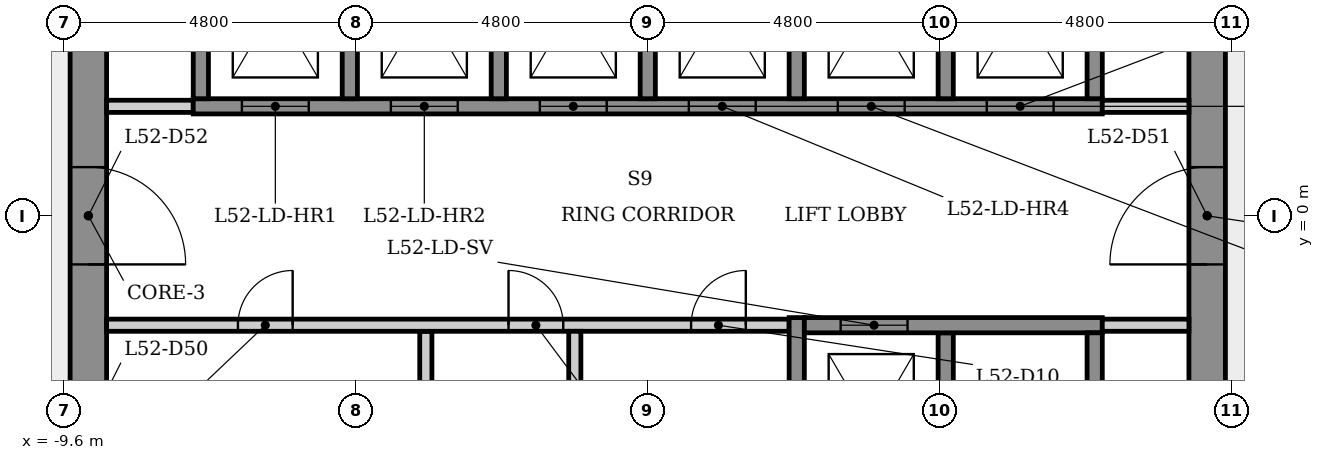
"""IFC4 building model, lengths in metres.
Left out: names, types, materials, properties, quantities, classifications, styles, units other than length and angle.
Written with IfcOpenShell. Run it as: python <this file> out.ifc"""

import sys

from ifc_helpers import new_model, si_unit, direction, frame, frame_2d, origin, place, context, subcontext, project, spatial, rectangle, extrude, element, fill, save


model = new_model("IFC4")
c1 = context("Model", 3, precision=1e-05, world=origin(), true_north=direction((0.0, 1.0)))
c2 = subcontext(c1, "Body", "Model", "MODEL_VIEW")
j1 = project(units=[si_unit("LENGTHUNIT", "METRE"), si_unit("PLANEANGLEUNIT", "RADIAN")], contexts=[c1])
p1 = place(None, origin())
s1 = spatial("IfcSite", under=j1, at=p1, CompositionType="ELEMENT")
p2 = place(p1, origin())
s2 = spatial("IfcBuilding", under=s1, at=p2, CompositionType="ELEMENT")
p3 = place(p2, frame((0.0, 0.0, 194.7)))
s3 = spatial("IfcBuildingStorey", under=s2, at=p3, CompositionType="ELEMENT", Elevation=194.7)
p4 = place(p3, frame((9.2, -5.485, 0.0), z_axis=(0.0, 0.0, 1.0), x_axis=(0.0, 1.0, 0.0)))
e1 = element("IfcWall", 1, at=p4, inside=s3, PredefinedType="SHEAR", context=c2, shape_type="SweptSolid", body=[
    extrude(rectangle(XDim=10.97, YDim=0.6, at=frame_2d((5.485, 0.0))), origin(), (0.0, 0.0, 1.0), 4.0),
])
p5 = place(p4, frame((4.685, 0.0, 0.0)))
e2 = element("IfcOpeningElement", 2, at=p5, cuts=e1, PredefinedType="OPENING", context=c2, shape_type="SweptSolid", body=[
    extrude(rectangle(XDim=1.6, YDim=2.1, at=frame_2d((0.8, 1.05))), frame((0.0, 0.31, 0.0), z_axis=(0.0, -1.0, 0.0), x_axis=(1.0, 0.0, 0.0)), (0.0, 0.0, 1.0), 0.62),
])
p6 = place(p3, frame((-9.2, 5.485, 0.0), z_axis=(0.0, 0.0, 1.0), x_axis=(0.0, -1.0, 0.0)))
e3 = element("IfcWall", 3, at=p6, inside=s3, PredefinedType="SHEAR", context=c2, shape_type="SweptSolid", body=[
    extrude(rectangle(XDim=10.97, YDim=0.6, at=frame_2d((5.485, 0.0))), origin(), (0.0, 0.0, 1.0), 4.0),
])
p7 = place(p6, frame((8.516, 0.0, 0.0)))
e4 = element("IfcOpeningElement", 4, at=p7, cuts=e3, PredefinedType="OPENING", context=c2, shape_type="SweptSolid", body=[
    extrude(rectangle(XDim=0.9, YDim=2.1, at=frame_2d((0.45, 1.05))), frame((0.0, 0.31, 0.0), z_axis=(0.0, -1.0, 0.0), x_axis=(1.0, 0.0, 0.0)), (0.0, 0.0, 1.0), 0.62),
])
p8 = place(p6, frame((4.685, 0.0, 0.0)))
e5 = element("IfcOpeningElement", 5, at=p8, cuts=e3, PredefinedType="OPENING", context=c2, shape_type="SweptSolid", body=[
    extrude(rectangle(XDim=1.6, YDim=2.1, at=frame_2d((0.8, 1.05))), frame((0.0, 0.31, 0.0), z_axis=(0.0, -1.0, 0.0), x_axis=(1.0, 0.0, 0.0)), (0.0, 0.0, 1.0), 0.62),
])
p9 = place(p3, frame((-8.9, 1.8, 0.0), z_axis=(0.0, 0.0, 1.0), x_axis=(1.0, 0.0, 0.0)))
e6 = element("IfcWall", 6, at=p9, inside=s3, PredefinedType="PARTITIONING", context=c2, shape_type="SweptSolid", body=[
    extrude(rectangle(XDim=1.425, YDim=0.2, at=frame_2d((0.712, 0.0))), origin(), (0.0, 0.0, 1.0), 3.65),
])
p10 = place(p3, frame((-7.475, 1.8, 0.0), z_axis=(0.0, 0.0, 1.0), x_axis=(1.0, 0.0, 0.0)))
e7 = element("IfcWall", 7, at=p10, inside=s3, PredefinedType="SHEAR", context=c2, shape_type="SweptSolid", body=[
    extrude(rectangle(XDim=14.95, YDim=0.25, at=frame_2d((7.475, 0.0))), origin(), (0.0, 0.0, 1.0), 3.65),
])
p11 = place(p10, frame((0.8, 0.0, 0.0)))
e8 = element("IfcOpeningElement", 8, at=p11, cuts=e7, PredefinedType="OPENING", context=c2, shape_type="SweptSolid", body=[
    extrude(rectangle(XDim=1.1, YDim=2.1, at=frame_2d((0.55, 1.05))), frame((0.0, 0.135, 0.0), z_axis=(0.0, -1.0, 0.0), x_axis=(1.0, 0.0, 0.0)), (0.0, 0.0, 1.0), 0.27),
])
p12 = place(p10, frame((3.25, 0.0, 0.0)))
e9 = element("IfcOpeningElement", 9, at=p12, cuts=e7, PredefinedType="OPENING", context=c2, shape_type="SweptSolid", body=[
    extrude(rectangle(XDim=1.1, YDim=2.1, at=frame_2d((0.55, 1.05))), frame((0.0, 0.135, 0.0), z_axis=(0.0, -1.0, 0.0), x_axis=(1.0, 0.0, 0.0)), (0.0, 0.0, 1.0), 0.27),
])
p13 = place(p10, frame((5.7, 0.0, 0.0)))
e10 = element("IfcOpeningElement", 10, at=p13, cuts=e7, PredefinedType="OPENING", context=c2, shape_type="SweptSolid", body=[
    extrude(rectangle(XDim=1.1, YDim=2.1, at=frame_2d((0.55, 1.05))), frame((0.0, 0.135, 0.0), z_axis=(0.0, -1.0, 0.0), x_axis=(1.0, 0.0, 0.0)), (0.0, 0.0, 1.0), 0.27),
])
p14 = place(p10, frame((8.15, 0.0, 0.0)))
e11 = element("IfcOpeningElement", 11, at=p14, cuts=e7, PredefinedType="OPENING", context=c2, shape_type="SweptSolid", body=[
    extrude(rectangle(XDim=1.1, YDim=2.1, at=frame_2d((0.55, 1.05))), frame((0.0, 0.135, 0.0), z_axis=(0.0, -1.0, 0.0), x_axis=(1.0, 0.0, 0.0)), (0.0, 0.0, 1.0), 0.27),
])
p15 = place(p10, frame((10.6, 0.0, 0.0)))
e12 = element("IfcOpeningElement", 12, at=p15, cuts=e7, PredefinedType="OPENING", context=c2, shape_type="SweptSolid", body=[
    extrude(rectangle(XDim=1.1, YDim=2.1, at=frame_2d((0.55, 1.05))), frame((0.0, 0.135, 0.0), z_axis=(0.0, -1.0, 0.0), x_axis=(1.0, 0.0, 0.0)), (0.0, 0.0, 1.0), 0.27),
])
p16 = place(p10, frame((13.05, 0.0, 0.0)))
e13 = element("IfcOpeningElement", 13, at=p16, cuts=e7, PredefinedType="OPENING", context=c2, shape_type="SweptSolid", body=[
    extrude(rectangle(XDim=1.1, YDim=2.1, at=frame_2d((0.55, 1.05))), frame((0.0, 0.135, 0.0), z_axis=(0.0, -1.0, 0.0), x_axis=(1.0, 0.0, 0.0)), (0.0, 0.0, 1.0), 0.27),
])
p17 = place(p3, frame((-7.35, 1.925, 0.0), z_axis=(0.0, 0.0, 1.0), x_axis=(0.0, 1.0, 0.0)))
e14 = element("IfcWall", 14, at=p17, inside=s3, PredefinedType="SHEAR", context=c2, shape_type="SweptSolid", body=[
    extrude(rectangle(XDim=4.036, YDim=0.25, at=frame_2d((2.018, 0.0))), origin(), (0.0, 0.0, 1.0), 3.65),
])
p18 = place(p3, frame((-4.9, 5.025, 0.0), z_axis=(0.0, 0.0, 1.0), x_axis=(0.0, -1.0, 0.0)))
e15 = element("IfcWall", 15, at=p18, inside=s3, PredefinedType="SHEAR", context=c2, shape_type="SweptSolid", body=[
    extrude(rectangle(XDim=3.1, YDim=0.25, at=frame_2d((1.55, 0.0))), origin(), (0.0, 0.0, 1.0), 4.0),
])
p19 = place(p3, frame((-3.65, -1.9, 0.0), z_axis=(0.0, 0.0, 1.0), x_axis=(0.0, -1.0, 0.0)))
e16 = element("IfcWall", 16, at=p19, inside=s3, PredefinedType="PARTITIONING", context=c2, shape_type="SweptSolid", body=[
    extrude(rectangle(XDim=3.15, YDim=0.2, at=frame_2d((1.575, 0.0))), origin(), (0.0, 0.0, 1.0), 3.65),
])
p20 = place(p3, frame((-8.9, -1.8, 0.0), z_axis=(0.0, 0.0, 1.0), x_axis=(1.0, 0.0, 0.0)))
e17 = element("IfcWall", 17, at=p20, inside=s3, PredefinedType="PARTITIONING", context=c2, shape_type="SweptSolid", body=[
    extrude(rectangle(XDim=11.225, YDim=0.2, at=frame_2d((5.613, 0.0))), origin(), (0.0, 0.0, 1.0), 3.65),
])
p21 = place(p20, frame((2.16, 0.0, 0.0)))
e18 = element("IfcOpeningElement", 18, at=p21, cuts=e17, PredefinedType="OPENING", context=c2, shape_type="SweptSolid", body=[
    extrude(rectangle(XDim=0.9, YDim=2.1, at=frame_2d((0.45, 1.05))), frame((0.0, 0.11, 0.0), z_axis=(0.0, -1.0, 0.0), x_axis=(1.0, 0.0, 0.0)), (0.0, 0.0, 1.0), 0.22),
])
p22 = place(p20, frame((6.61, 0.0, 0.0)))
e19 = element("IfcOpeningElement", 19, at=p22, cuts=e17, PredefinedType="OPENING", context=c2, shape_type="SweptSolid", body=[
    extrude(rectangle(XDim=0.9, YDim=2.1, at=frame_2d((0.45, 1.05))), frame((0.0, 0.11, 0.0), z_axis=(0.0, -1.0, 0.0), x_axis=(1.0, 0.0, 0.0)), (0.0, 0.0, 1.0), 0.22),
])
p23 = place(p20, frame((9.613, 0.0, 0.0)))
e20 = element("IfcOpeningElement", 20, at=p23, cuts=e17, PredefinedType="OPENING", context=c2, shape_type="SweptSolid", body=[
    extrude(rectangle(XDim=0.9, YDim=2.1, at=frame_2d((0.45, 1.05))), frame((0.0, 0.11, 0.0), z_axis=(0.0, -1.0, 0.0), x_axis=(1.0, 0.0, 0.0)), (0.0, 0.0, 1.0), 0.22),
])
p24 = place(p3, frame((-2.45, 5.025, 0.0), z_axis=(0.0, 0.0, 1.0), x_axis=(0.0, -1.0, 0.0)))
e21 = element("IfcWall", 21, at=p24, inside=s3, PredefinedType="SHEAR", context=c2, shape_type="SweptSolid", body=[
    extrude(rectangle(XDim=3.1, YDim=0.25, at=frame_2d((1.55, 0.0))), origin(), (0.0, 0.0, 1.0), 4.0),
])
p25 = place(p3, frame((-1.2, -1.9, 0.0), z_axis=(0.0, 0.0, 1.0), x_axis=(0.0, -1.0, 0.0)))
e22 = element("IfcWall", 22, at=p25, inside=s3, PredefinedType="PARTITIONING", context=c2, shape_type="SweptSolid", body=[
    extrude(rectangle(XDim=3.15, YDim=0.2, at=frame_2d((1.575, 0.0))), origin(), (0.0, 0.0, 1.0), 3.65),
])
p26 = place(p3, frame((0.0, 5.025, 0.0), z_axis=(0.0, 0.0, 1.0), x_axis=(0.0, -1.0, 0.0)))
e23 = element("IfcWall", 23, at=p26, inside=s3, PredefinedType="SHEAR", context=c2, shape_type="SweptSolid", body=[
    extrude(rectangle(XDim=3.1, YDim=0.25, at=frame_2d((1.55, 0.0))), origin(), (0.0, 0.0, 1.0), 4.0),
])
p27 = place(p3, frame((2.45, -5.275, 0.0), z_axis=(0.0, 0.0, 1.0), x_axis=(0.0, 1.0, 0.0)))
e24 = element("IfcWall", 24, at=p27, inside=s3, PredefinedType="SHEAR", context=c2, shape_type="SweptSolid", body=[
    extrude(rectangle(XDim=3.6, YDim=0.25, at=frame_2d((1.8, 0.0))), origin(), (0.0, 0.0, 1.0), 3.65),
])
for number, where, z_axis, x_axis in (
    (25, (2.45, 5.025, 0.0), (0.0, 0.0, 1.0), (0.0, -1.0, 0.0)),
    (26, (4.9, -1.925, 0.0), (0.0, 0.0, 1.0), (0.0, -1.0, 0.0)),
    (27, (4.9, 5.025, 0.0), (0.0, 0.0, 1.0), (0.0, -1.0, 0.0)),
):
    element("IfcWall", number, at=place(p3, frame(where, z_axis=z_axis, x_axis=x_axis)), inside=s3, PredefinedType="SHEAR", context=c2, shape_type="SweptSolid", body=[
        extrude(rectangle(XDim=3.1, YDim=0.25, at=frame_2d((1.55, 0.0))), origin(), (0.0, 0.0, 1.0), 4.0),
    ])
p28 = place(p3, frame((2.575, -1.8, 0.0), z_axis=(0.0, 0.0, 1.0), x_axis=(1.0, 0.0, 0.0)))
e28 = element("IfcWall", 28, at=p28, inside=s3, PredefinedType="SHEAR", context=c2, shape_type="SweptSolid", body=[
    extrude(rectangle(XDim=4.9, YDim=0.25, at=frame_2d((2.45, 0.0))), origin(), (0.0, 0.0, 1.0), 3.65),
])
p29 = place(p28, frame((0.597, 0.0, 0.0)))
e29 = element("IfcOpeningElement", 29, at=p29, cuts=e28, PredefinedType="OPENING", context=c2, shape_type="SweptSolid", body=[
    extrude(rectangle(XDim=1.1, YDim=2.1, at=frame_2d((0.55, 1.05))), frame((0.0, 0.135, 0.0), z_axis=(0.0, -1.0, 0.0), x_axis=(1.0, 0.0, 0.0)), (0.0, 0.0, 1.0), 0.27),
])
p30 = place(p3, frame((7.475, 1.8, 0.0), z_axis=(0.0, 0.0, 1.0), x_axis=(1.0, 0.0, 0.0)))
e30 = element("IfcWall", 30, at=p30, inside=s3, PredefinedType="PARTITIONING", context=c2, shape_type="SweptSolid", body=[
    extrude(rectangle(XDim=1.425, YDim=0.2, at=frame_2d((0.712, 0.0))), origin(), (0.0, 0.0, 1.0), 3.65),
])
for number, where, z_axis, x_axis in (
    (31, (7.35, -1.925, 0.0), (0.0, 0.0, 1.0), (0.0, -1.0, 0.0)),
    (32, (7.35, 5.025, 0.0), (0.0, 0.0, 1.0), (0.0, -1.0, 0.0)),
):
    element("IfcWall", number, at=place(p3, frame(where, z_axis=z_axis, x_axis=x_axis)), inside=s3, PredefinedType="SHEAR", context=c2, shape_type="SweptSolid", body=[
        extrude(rectangle(XDim=3.1, YDim=0.25, at=frame_2d((1.55, 0.0))), origin(), (0.0, 0.0, 1.0), 4.0),
    ])
p31 = place(p3, frame((8.9, -1.8, 0.0), z_axis=(0.0, 0.0, 1.0), x_axis=(-1.0, 0.0, 0.0)))
e33 = element("IfcWall", 33, at=p31, inside=s3, PredefinedType="PARTITIONING", context=c2, shape_type="SweptSolid", body=[
    extrude(rectangle(XDim=1.425, YDim=0.2, at=frame_2d((0.712, 0.0))), origin(), (0.0, 0.0, 1.0), 3.65),
])
p32 = place(p11, origin())
e34 = element("IfcDoor", 34, at=p32, inside=s3, OperationType="SLIDING_TO_LEFT", PredefinedType="DOOR", context=c2, shape_type="SweptSolid", body=[
    extrude(rectangle(XDim=1.1, YDim=2.1, at=frame_2d((0.55, 1.05))), frame((0.0, 0.025, 0.0), z_axis=(0.0, -1.0, 0.0), x_axis=(1.0, 0.0, 0.0)), (0.0, 0.0, 1.0), 0.05),
])
fill(e8, e34)
p33 = place(p12, origin())
e35 = element("IfcDoor", 35, at=p33, inside=s3, OperationType="SLIDING_TO_LEFT", PredefinedType="DOOR", context=c2, shape_type="SweptSolid", body=[
    extrude(rectangle(XDim=1.1, YDim=2.1, at=frame_2d((0.55, 1.05))), frame((0.0, 0.025, 0.0), z_axis=(0.0, -1.0, 0.0), x_axis=(1.0, 0.0, 0.0)), (0.0, 0.0, 1.0), 0.05),
])
fill(e9, e35)
p34 = place(p13, origin())
e36 = element("IfcDoor", 36, at=p34, inside=s3, OperationType="SLIDING_TO_LEFT", PredefinedType="DOOR", context=c2, shape_type="SweptSolid", body=[
    extrude(rectangle(XDim=1.1, YDim=2.1, at=frame_2d((0.55, 1.05))), frame((0.0, 0.025, 0.0), z_axis=(0.0, -1.0, 0.0), x_axis=(1.0, 0.0, 0.0)), (0.0, 0.0, 1.0), 0.05),
])
fill(e10, e36)
p35 = place(p14, origin())
e37 = element("IfcDoor", 37, at=p35, inside=s3, OperationType="SLIDING_TO_LEFT", PredefinedType="DOOR", context=c2, shape_type="SweptSolid", body=[
    extrude(rectangle(XDim=1.1, YDim=2.1, at=frame_2d((0.55, 1.05))), frame((0.0, 0.025, 0.0), z_axis=(0.0, -1.0, 0.0), x_axis=(1.0, 0.0, 0.0)), (0.0, 0.0, 1.0), 0.05),
])
fill(e11, e37)
p36 = place(p15, origin())
e38 = element("IfcDoor", 38, at=p36, inside=s3, OperationType="SLIDING_TO_LEFT", PredefinedType="DOOR", context=c2, shape_type="SweptSolid", body=[
    extrude(rectangle(XDim=1.1, YDim=2.1, at=frame_2d((0.55, 1.05))), frame((0.0, 0.025, 0.0), z_axis=(0.0, -1.0, 0.0), x_axis=(1.0, 0.0, 0.0)), (0.0, 0.0, 1.0), 0.05),
])
fill(e12, e38)
p37 = place(p16, origin())
e39 = element("IfcDoor", 39, at=p37, inside=s3, OperationType="SLIDING_TO_LEFT", PredefinedType="DOOR", context=c2, shape_type="SweptSolid", body=[
    extrude(rectangle(XDim=1.1, YDim=2.1, at=frame_2d((0.55, 1.05))), frame((0.0, 0.025, 0.0), z_axis=(0.0, -1.0, 0.0), x_axis=(1.0, 0.0, 0.0)), (0.0, 0.0, 1.0), 0.05),
])
fill(e13, e39)
p38 = place(p29, origin())
e40 = element("IfcDoor", 40, at=p38, inside=s3, OperationType="SLIDING_TO_LEFT", PredefinedType="DOOR", context=c2, shape_type="SweptSolid", body=[
    extrude(rectangle(XDim=1.1, YDim=2.1, at=frame_2d((0.55, 1.05))), frame((0.0, 0.025, 0.0), z_axis=(0.0, -1.0, 0.0), x_axis=(1.0, 0.0, 0.0)), (0.0, 0.0, 1.0), 0.05),
])
fill(e29, e40)
p39 = place(p21, origin())
e41 = element("IfcDoor", 41, at=p39, inside=s3, OperationType="SINGLE_SWING_RIGHT", PredefinedType="DOOR", context=c2, shape_type="SweptSolid", body=[
    extrude(rectangle(XDim=0.9, YDim=2.1, at=frame_2d((0.45, 1.05))), frame((0.0, 0.025, 0.0), z_axis=(0.0, -1.0, 0.0), x_axis=(1.0, 0.0, 0.0)), (0.0, 0.0, 1.0), 0.05),
])
fill(e18, e41)
p40 = place(p22, origin())
e42 = element("IfcDoor", 42, at=p40, inside=s3, OperationType="SINGLE_SWING_LEFT", PredefinedType="DOOR", context=c2, shape_type="SweptSolid", body=[
    extrude(rectangle(XDim=0.9, YDim=2.1, at=frame_2d((0.45, 1.05))), frame((0.0, 0.025, 0.0), z_axis=(0.0, -1.0, 0.0), x_axis=(1.0, 0.0, 0.0)), (0.0, 0.0, 1.0), 0.05),
])
fill(e19, e42)
p41 = place(p23, origin())
e43 = element("IfcDoor", 43, at=p41, inside=s3, OperationType="SINGLE_SWING_RIGHT", PredefinedType="DOOR", context=c2, shape_type="SweptSolid", body=[
    extrude(rectangle(XDim=0.9, YDim=2.1, at=frame_2d((0.45, 1.05))), frame((0.0, 0.025, 0.0), z_axis=(0.0, -1.0, 0.0), x_axis=(1.0, 0.0, 0.0)), (0.0, 0.0, 1.0), 0.05),
])
fill(e20, e43)
p42 = place(p5, origin())
e44 = element("IfcDoor", 44, at=p42, inside=s3, OperationType="SINGLE_SWING_LEFT", PredefinedType="DOOR", context=c2, shape_type="SweptSolid", body=[
    extrude(rectangle(XDim=1.6, YDim=2.1, at=frame_2d((0.8, 1.05))), frame((0.0, 0.025, 0.0), z_axis=(0.0, -1.0, 0.0), x_axis=(1.0, 0.0, 0.0)), (0.0, 0.0, 1.0), 0.05),
])
fill(e2, e44)
p43 = place(p8, origin())
e45 = element("IfcDoor", 45, at=p43, inside=s3, OperationType="SINGLE_SWING_RIGHT", PredefinedType="DOOR", context=c2, shape_type="SweptSolid", body=[
    extrude(rectangle(XDim=1.6, YDim=2.1, at=frame_2d((0.8, 1.05))), frame((0.0, 0.025, 0.0), z_axis=(0.0, -1.0, 0.0), x_axis=(1.0, 0.0, 0.0)), (0.0, 0.0, 1.0), 0.05),
])
fill(e5, e45)
save(model, sys.argv[1])
